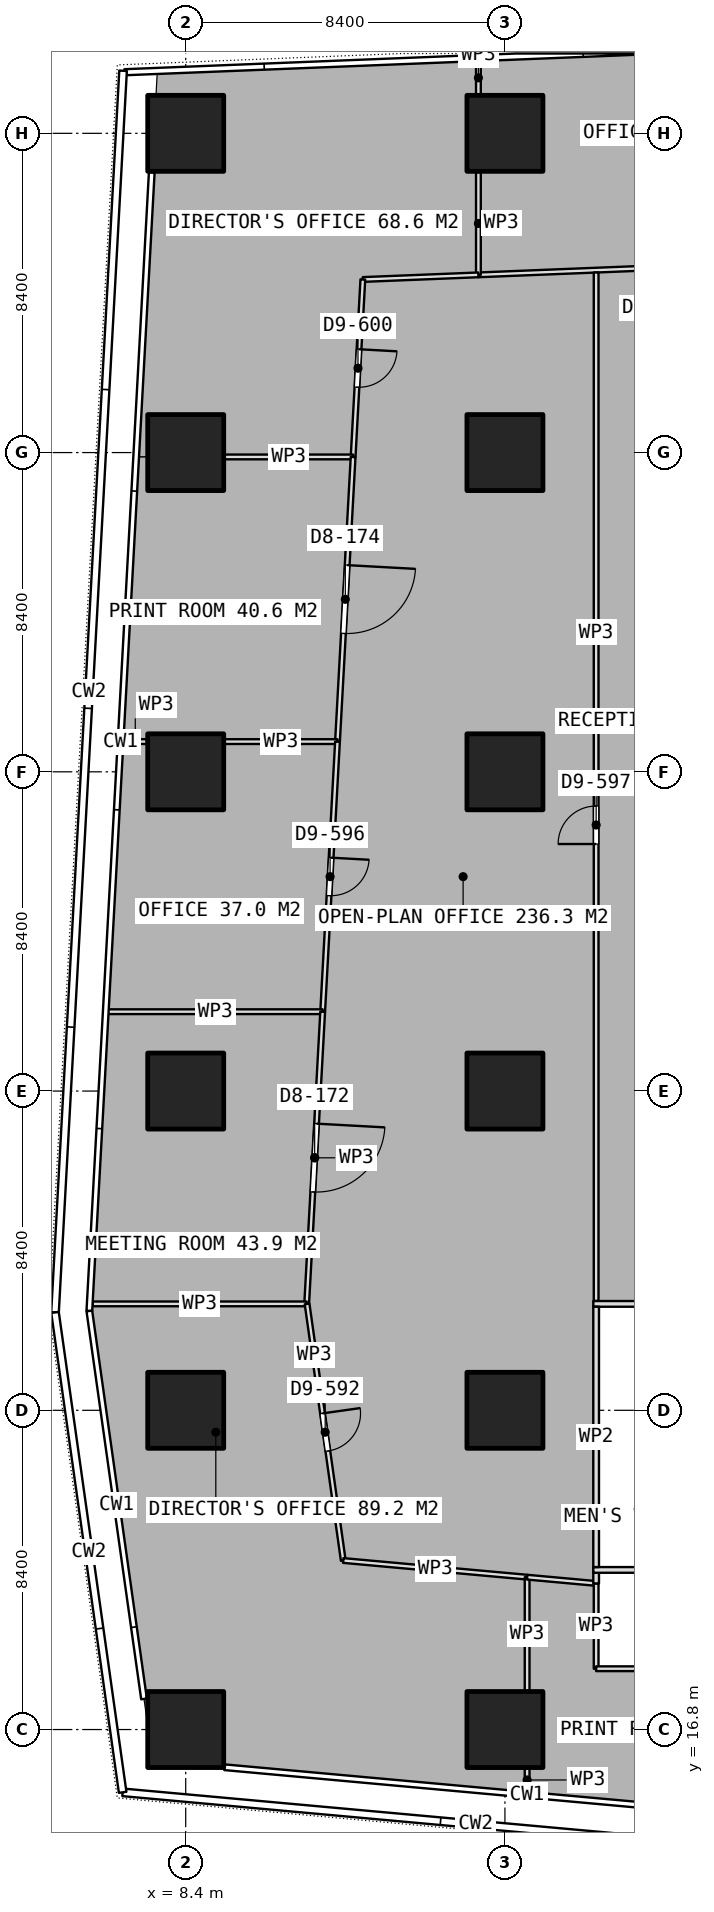
"""IFC4 building model, lengths in metres.
Left out: names, types, materials, properties, quantities, classifications, styles, units other than length and angle.
Written with IfcOpenShell. Run it as: python <this file> out.ifc"""

import sys

from ifc_helpers import new_model, si_unit, direction, frame, frame_2d, origin, origin_2d, place, context, subcontext, project, spatial, rectangle, extrude, element, fill, save


model = new_model("IFC4")
c1 = context("Model", 3, precision=1e-05, world=origin(), true_north=direction((0.0, 1.0)))
c2 = subcontext(c1, "Body", "Model", "MODEL_VIEW")
j1 = project(units=[si_unit("LENGTHUNIT", "METRE"), si_unit("PLANEANGLEUNIT", "RADIAN")], contexts=[c1])
p1 = place(None, origin())
s1 = spatial("IfcSite", under=j1, at=p1, CompositionType="ELEMENT")
p2 = place(p1, origin())
s2 = spatial("IfcBuilding", under=s1, at=p2, CompositionType="ELEMENT")
p3 = place(p2, frame((0.0, 0.0, 147.8)))
s3 = spatial("IfcBuildingStorey", under=s2, at=p3, CompositionType="ELEMENT", Elevation=147.8)
for number, where, z_axis, x_axis in (
    (1, (8.4, 16.8, 0.0), (0.0, 0.0, 1.0), (1.0, 0.0, 0.0)),
    (2, (8.4, 25.2, 0.0), (0.0, 0.0, 1.0), (1.0, 0.0, 0.0)),
    (3, (8.4, 33.6, 0.0), (0.0, 0.0, 1.0), (1.0, 0.0, 0.0)),
    (4, (8.4, 42.0, 0.0), (0.0, 0.0, 1.0), (1.0, 0.0, 0.0)),
    (5, (8.4, 50.4, 0.0), (0.0, 0.0, 1.0), (1.0, 0.0, 0.0)),
    (6, (8.4, 58.8, 0.0), (0.0, 0.0, 1.0), (1.0, 0.0, 0.0)),
    (7, (16.8, 16.8, 0.0), (0.0, 0.0, 1.0), (1.0, 0.0, 0.0)),
    (8, (16.8, 25.2, 0.0), (0.0, 0.0, 1.0), (1.0, 0.0, 0.0)),
    (9, (16.8, 33.6, 0.0), (0.0, 0.0, 1.0), (1.0, 0.0, 0.0)),
    (10, (16.8, 42.0, 0.0), (0.0, 0.0, 1.0), (1.0, 0.0, 0.0)),
    (11, (16.8, 50.4, 0.0), (0.0, 0.0, 1.0), (1.0, 0.0, 0.0)),
    (12, (16.8, 58.8, 0.0), (0.0, 0.0, 1.0), (1.0, 0.0, 0.0)),
):
    element("IfcColumn", number, at=place(p3, frame(where, z_axis=z_axis, x_axis=x_axis)), inside=s3, PredefinedType="COLUMN", context=c2, shape_type="SweptSolid", body=[
        extrude(rectangle(XDim=2.0, YDim=2.0, at=origin_2d()), origin(), (0.0, 0.0, 1.0), 3.75),
    ])
for number, where, z_axis, x_axis in (
    (13, (19.125, 21.0, 0.0), (0.0, 0.0, 1.0), (1.0, 0.0, 0.0)),
    (14, (19.125, 28.0, 0.0), (0.0, 0.0, 1.0), (1.0, 0.0, 0.0)),
):
    element("IfcWall", number, at=place(p3, frame(where, z_axis=z_axis, x_axis=x_axis)), inside=s3, PredefinedType="PARTITIONING", context=c2, shape_type="SweptSolid", body=[
        extrude(rectangle(XDim=3.35, YDim=0.15, at=frame_2d((1.675, 0.0))), origin(), (0.0, 0.0, 1.0), 3.5),
    ])
p4 = place(p3, frame((19.2, 21.075, 0.0), z_axis=(0.0, 0.0, 1.0), x_axis=(0.0, 1.0, 0.0)))
e15 = element("IfcWall", 15, at=p4, inside=s3, PredefinedType="PARTITIONING", context=c2, shape_type="SweptSolid", body=[
    extrude(rectangle(XDim=6.85, YDim=0.15, at=frame_2d((3.425, 0.0))), origin(), (0.0, 0.0, 1.0), 3.5),
])
p5 = place(p3, frame((25.413, 55.449, 0.0), z_axis=(0.0, 0.0, 1.0), x_axis=(-0.999198361773, -0.04003290935, 0.0)))
e16 = element("IfcWall", 16, at=p5, inside=s3, PredefinedType="PARTITIONING", context=c2, shape_type="SweptSolid", body=[
    extrude(rectangle(XDim=9.319, YDim=0.125, at=frame_2d((4.659, 0.0))), origin(), (0.0, 0.0, 1.0), 3.5),
])
p6 = place(p5, frame((4.159, 0.0, 0.0)))
e17 = element("IfcOpeningElement", 17, at=p6, cuts=e16, PredefinedType="OPENING", context=c2, shape_type="SweptSolid", body=[
    extrude(rectangle(XDim=1.0, YDim=2.1, at=frame_2d((0.5, 1.05))), frame((0.0, 0.073, 0.0), z_axis=(0.0, -1.0, 0.0), x_axis=(1.0, 0.0, 0.0)), (0.0, 0.0, 1.0), 0.145),
])
p7 = place(p3, frame((16.102, 55.076, 0.0), z_axis=(0.0, 0.0, 1.0), x_axis=(0.0, 1.0, 0.0)))
e18 = element("IfcWall", 18, at=p7, inside=s3, PredefinedType="PARTITIONING", context=c2, shape_type="SweptSolid", body=[
    extrude(rectangle(XDim=2.704, YDim=0.125, at=frame_2d((1.352, 0.0))), origin(), (0.0, 0.0, 1.0), 3.5),
])
p8 = place(p3, frame((16.102, 59.82, 0.0), z_axis=(0.0, 0.0, 1.0), x_axis=(0.0, 1.0, 0.0)))
e19 = element("IfcWall", 19, at=p8, inside=s3, PredefinedType="PARTITIONING", context=c2, shape_type="SweptSolid", body=[
    extrude(rectangle(XDim=0.88, YDim=0.125, at=frame_2d((0.44, 0.0))), origin(), (0.0, 0.0, 1.0), 3.5),
])
p9 = place(p3, frame((16.101, 55.076, 0.0), z_axis=(0.0, 0.0, 1.0), x_axis=(-0.999198007742, -0.040041744769, 0.0)))
e20 = element("IfcWall", 20, at=p9, inside=s3, PredefinedType="PARTITIONING", context=c2, shape_type="SweptSolid", body=[
    extrude(rectangle(XDim=3.042, YDim=0.125, at=frame_2d((1.521, 0.0))), origin(), (0.0, 0.0, 1.0), 3.5),
])
p10 = place(p3, frame((13.061, 54.954, 0.0), z_axis=(0.0, 0.0, 1.0), x_axis=(-0.054767351649, -0.99849914231, 0.0)))
e21 = element("IfcWall", 21, at=p10, inside=s3, PredefinedType="PARTITIONING", context=c2, shape_type="SweptSolid", body=[
    extrude(rectangle(XDim=4.676, YDim=0.125, at=frame_2d((2.338, 0.0))), origin(), (0.0, 0.0, 1.0), 3.5),
])
p11 = place(p10, frame((1.838, 0.0, 0.0)))
e22 = element("IfcOpeningElement", 22, at=p11, cuts=e21, PredefinedType="OPENING", context=c2, shape_type="SweptSolid", body=[
    extrude(rectangle(XDim=1.0, YDim=2.1, at=frame_2d((0.5, 1.05))), frame((0.0, 0.073, 0.0), z_axis=(0.0, -1.0, 0.0), x_axis=(1.0, 0.0, 0.0)), (0.0, 0.0, 1.0), 0.145),
])
p12 = place(p3, frame((12.805, 50.285, 0.0), z_axis=(0.0, 0.0, 1.0), x_axis=(-1.0, 0.0, 0.0)))
e23 = element("IfcWall", 23, at=p12, inside=s3, PredefinedType="PARTITIONING", context=c2, shape_type="SweptSolid", body=[
    extrude(rectangle(XDim=3.385, YDim=0.125, at=frame_2d((1.692, 0.0))), origin(), (0.0, 0.0, 1.0), 3.5),
])
p13 = place(p3, frame((12.805, 50.284, 0.0), z_axis=(0.0, 0.0, 1.0), x_axis=(-0.054783132828, -0.998498276592, 0.0)))
e24 = element("IfcWall", 24, at=p13, inside=s3, PredefinedType="PARTITIONING", context=c2, shape_type="SweptSolid", body=[
    extrude(rectangle(XDim=7.5, YDim=0.125, at=frame_2d((3.75, 0.0))), origin(), (0.0, 0.0, 1.0), 3.5),
])
p14 = place(p13, frame((2.85, 0.0, 0.0)))
e25 = element("IfcOpeningElement", 25, at=p14, cuts=e24, PredefinedType="OPENING", context=c2, shape_type="SweptSolid", body=[
    extrude(rectangle(XDim=1.8, YDim=2.1, at=frame_2d((0.9, 1.05))), frame((0.0, 0.073, 0.0), z_axis=(0.0, -1.0, 0.0), x_axis=(1.0, 0.0, 0.0)), (0.0, 0.0, 1.0), 0.145),
])
p15 = place(p3, frame((12.394, 42.795, 0.0), z_axis=(0.0, 0.0, 1.0), x_axis=(-1.0, 0.0, 0.0)))
e26 = element("IfcWall", 26, at=p15, inside=s3, PredefinedType="PARTITIONING", context=c2, shape_type="SweptSolid", body=[
    extrude(rectangle(XDim=2.974, YDim=0.125, at=frame_2d((1.487, 0.0))), origin(), (0.0, 0.0, 1.0), 3.5),
])
p16 = place(p3, frame((7.38, 42.795, 0.0), z_axis=(0.0, 0.0, 1.0), x_axis=(-1.0, 0.0, 0.0)))
e27 = element("IfcWall", 27, at=p16, inside=s3, PredefinedType="PARTITIONING", context=c2, shape_type="SweptSolid", body=[
    extrude(rectangle(XDim=0.614, YDim=0.125, at=frame_2d((0.307, 0.0))), origin(), (0.0, 0.0, 1.0), 3.5),
])
p17 = place(p3, frame((12.394, 42.794, 0.0), z_axis=(0.0, 0.0, 1.0), x_axis=(-0.054820208694, -0.998496241715, 0.0)))
e28 = element("IfcWall", 28, at=p17, inside=s3, PredefinedType="PARTITIONING", context=c2, shape_type="SweptSolid", body=[
    extrude(rectangle(XDim=7.117, YDim=0.125, at=frame_2d((3.558, 0.0))), origin(), (0.0, 0.0, 1.0), 3.5),
])
p18 = place(p17, frame((3.058, 0.0, 0.0)))
e29 = element("IfcOpeningElement", 29, at=p18, cuts=e28, PredefinedType="OPENING", context=c2, shape_type="SweptSolid", body=[
    extrude(rectangle(XDim=1.0, YDim=2.1, at=frame_2d((0.5, 1.05))), frame((0.0, 0.073, 0.0), z_axis=(0.0, -1.0, 0.0), x_axis=(1.0, 0.0, 0.0)), (0.0, 0.0, 1.0), 0.145),
])
p19 = place(p3, frame((12.004, 35.688, 0.0), z_axis=(0.0, 0.0, 1.0), x_axis=(-1.0, 0.0, 0.0)))
e30 = element("IfcWall", 30, at=p19, inside=s3, PredefinedType="PARTITIONING", context=c2, shape_type="SweptSolid", body=[
    extrude(rectangle(XDim=5.658, YDim=0.125, at=frame_2d((2.829, 0.0))), origin(), (0.0, 0.0, 1.0), 3.5),
])
p20 = place(p3, frame((12.004, 35.687, 0.0), z_axis=(0.0, 0.0, 1.0), x_axis=(-0.054672599676, -0.998504334915, 0.0)))
e31 = element("IfcWall", 31, at=p20, inside=s3, PredefinedType="PARTITIONING", context=c2, shape_type="SweptSolid", body=[
    extrude(rectangle(XDim=7.698, YDim=0.125, at=frame_2d((3.849, 0.0))), origin(), (0.0, 0.0, 1.0), 3.5),
])
p21 = place(p20, frame((2.949, 0.0, 0.0)))
e32 = element("IfcOpeningElement", 32, at=p21, cuts=e31, PredefinedType="OPENING", context=c2, shape_type="SweptSolid", body=[
    extrude(rectangle(XDim=1.8, YDim=2.1, at=frame_2d((0.9, 1.05))), frame((0.0, 0.073, 0.0), z_axis=(0.0, -1.0, 0.0), x_axis=(1.0, 0.0, 0.0)), (0.0, 0.0, 1.0), 0.145),
])
p22 = place(p3, frame((11.583, 28.0, 0.0), z_axis=(0.0, 0.0, 1.0), x_axis=(-1.0, 0.0, 0.0)))
e33 = element("IfcWall", 33, at=p22, inside=s3, PredefinedType="PARTITIONING", context=c2, shape_type="SweptSolid", body=[
    extrude(rectangle(XDim=5.629, YDim=0.125, at=frame_2d((2.814, 0.0))), origin(), (0.0, 0.0, 1.0), 3.5),
])
p23 = place(p3, frame((11.594, 27.999, 0.0), z_axis=(0.0, 0.0, 1.0), x_axis=(0.139621335816, -0.990204969986, 0.0)))
e34 = element("IfcWall", 34, at=p23, inside=s3, PredefinedType="PARTITIONING", context=c2, shape_type="SweptSolid", body=[
    extrude(rectangle(XDim=6.818, YDim=0.125, at=frame_2d((3.409, 0.0))), origin(), (0.0, 0.0, 1.0), 3.5),
])
p24 = place(p23, frame((2.909, 0.0, 0.0)))
e35 = element("IfcOpeningElement", 35, at=p24, cuts=e34, PredefinedType="OPENING", context=c2, shape_type="SweptSolid", body=[
    extrude(rectangle(XDim=1.0, YDim=2.1, at=frame_2d((0.5, 1.05))), frame((0.0, 0.073, 0.0), z_axis=(0.0, -1.0, 0.0), x_axis=(1.0, 0.0, 0.0)), (0.0, 0.0, 1.0), 0.145),
])
p25 = place(p3, frame((12.546, 21.248, 0.0), z_axis=(0.0, 0.0, 1.0), x_axis=(0.995909256007, -0.090359027214, 0.0)))
e36 = element("IfcWall", 36, at=p25, inside=s3, PredefinedType="PARTITIONING", context=c2, shape_type="SweptSolid", body=[
    extrude(rectangle(XDim=4.858, YDim=0.125, at=frame_2d((2.429, 0.0))), origin(), (0.0, 0.0, 1.0), 3.5),
])
p26 = place(p3, frame((17.384, 20.809, 0.0), z_axis=(0.0, 0.0, 1.0), x_axis=(0.0, -1.0, 0.0)))
e37 = element("IfcWall", 37, at=p26, inside=s3, PredefinedType="PARTITIONING", context=c2, shape_type="SweptSolid", body=[
    extrude(rectangle(XDim=2.989, YDim=0.125, at=frame_2d((1.495, 0.0))), origin(), (0.0, 0.0, 1.0), 3.5),
])
p27 = place(p3, frame((17.384, 15.78, 0.0), z_axis=(0.0, 0.0, 1.0), x_axis=(0.0, -1.0, 0.0)))
e38 = element("IfcWall", 38, at=p27, inside=s3, PredefinedType="PARTITIONING", context=c2, shape_type="SweptSolid", body=[
    extrude(rectangle(XDim=0.614, YDim=0.125, at=frame_2d((0.307, 0.0))), origin(), (0.0, 0.0, 1.0), 3.5),
])
p28 = place(p3, frame((17.385, 20.809, 0.0), z_axis=(0.0, 0.0, 1.0), x_axis=(0.995891010038, -0.090559903522, 0.0)))
e39 = element("IfcWall", 39, at=p28, inside=s3, PredefinedType="PARTITIONING", context=c2, shape_type="SweptSolid", body=[
    extrude(rectangle(XDim=1.823, YDim=0.125, at=frame_2d((0.911, 0.0))), origin(), (0.0, 0.0, 1.0), 3.5),
])
p29 = place(p3, frame((19.2, 20.644, 0.0), z_axis=(0.0, 0.0, 1.0), x_axis=(0.0, -1.0, 0.0)))
e40 = element("IfcWall", 40, at=p29, inside=s3, PredefinedType="PARTITIONING", context=c2, shape_type="SweptSolid", body=[
    extrude(rectangle(XDim=2.244, YDim=0.125, at=frame_2d((1.122, 0.0))), origin(), (0.0, 0.0, 1.0), 3.5),
])
p30 = place(p3, frame((19.2, 18.4, 0.0), z_axis=(0.0, 0.0, 1.0), x_axis=(1.0, 0.0, 0.0)))
e41 = element("IfcWall", 41, at=p30, inside=s3, PredefinedType="PARTITIONING", context=c2, shape_type="SweptSolid", body=[
    extrude(rectangle(XDim=6.179, YDim=0.125, at=frame_2d((3.089, 0.0))), origin(), (0.0, 0.0, 1.0), 3.5),
])
p31 = place(p30, frame((2.59, 0.0, 0.0)))
e42 = element("IfcOpeningElement", 42, at=p31, cuts=e41, PredefinedType="OPENING", context=c2, shape_type="SweptSolid", body=[
    extrude(rectangle(XDim=1.0, YDim=2.1, at=frame_2d((0.5, 1.05))), frame((0.0, 0.073, 0.0), z_axis=(0.0, -1.0, 0.0), x_axis=(1.0, 0.0, 0.0)), (0.0, 0.0, 1.0), 0.145),
])
p32 = place(p3, frame((19.2, 28.075, 0.0), z_axis=(0.0, 0.0, 1.0), x_axis=(0.0, 1.0, 0.0)))
e43 = element("IfcWall", 43, at=p32, inside=s3, PredefinedType="PARTITIONING", context=c2, shape_type="SweptSolid", body=[
    extrude(rectangle(XDim=27.063, YDim=0.125, at=frame_2d((13.531, 0.0))), origin(), (0.0, 0.0, 1.0), 3.5),
])
p33 = place(p32, frame((12.025, 0.0, 0.0)))
e44 = element("IfcOpeningElement", 44, at=p33, cuts=e43, PredefinedType="OPENING", context=c2, shape_type="SweptSolid", body=[
    extrude(rectangle(XDim=1.0, YDim=2.1, at=frame_2d((0.5, 1.05))), frame((0.0, 0.073, 0.0), z_axis=(0.0, -1.0, 0.0), x_axis=(1.0, 0.0, 0.0)), (0.0, 0.0, 1.0), 0.145),
])
p34 = place(p3, frame((19.2, 21.075, 0.0), z_axis=(0.0, 0.0, 1.0), x_axis=(0.0, -1.0, 0.0)))
e45 = element("IfcWall", 45, at=p34, inside=s3, PredefinedType="PARTITIONING", context=c2, shape_type="SweptSolid", body=[
    extrude(rectangle(XDim=0.431, YDim=0.15, at=frame_2d((0.215, 0.0))), origin(), (0.0, 0.0, 1.0), 3.5),
])
p35 = place(p11, origin())
e46 = element("IfcDoor", 46, at=p35, inside=s3, OperationType="SINGLE_SWING_LEFT", PredefinedType="DOOR", context=c2, shape_type="SweptSolid", body=[
    extrude(rectangle(XDim=1.0, YDim=2.1, at=frame_2d((0.5, 1.05))), frame((0.0, 0.025, 0.0), z_axis=(0.0, -1.0, 0.0), x_axis=(1.0, 0.0, 0.0)), (0.0, 0.0, 1.0), 0.05),
])
fill(e22, e46)
p36 = place(p14, origin())
e47 = element("IfcDoor", 47, at=p36, inside=s3, OperationType="DOUBLE_DOOR_SINGLE_SWING", PredefinedType="DOOR", context=c2, shape_type="SweptSolid", body=[
    extrude(rectangle(XDim=1.8, YDim=2.1, at=frame_2d((0.9, 1.05))), frame((0.0, 0.025, 0.0), z_axis=(0.0, -1.0, 0.0), x_axis=(1.0, 0.0, 0.0)), (0.0, 0.0, 1.0), 0.05),
])
fill(e25, e47)
p37 = place(p18, origin())
e48 = element("IfcDoor", 48, at=p37, inside=s3, OperationType="SINGLE_SWING_LEFT", PredefinedType="DOOR", context=c2, shape_type="SweptSolid", body=[
    extrude(rectangle(XDim=1.0, YDim=2.1, at=frame_2d((0.5, 1.05))), frame((0.0, 0.025, 0.0), z_axis=(0.0, -1.0, 0.0), x_axis=(1.0, 0.0, 0.0)), (0.0, 0.0, 1.0), 0.05),
])
fill(e29, e48)
p38 = place(p21, origin())
e49 = element("IfcDoor", 49, at=p38, inside=s3, OperationType="DOUBLE_DOOR_SINGLE_SWING", PredefinedType="DOOR", context=c2, shape_type="SweptSolid", body=[
    extrude(rectangle(XDim=1.8, YDim=2.1, at=frame_2d((0.9, 1.05))), frame((0.0, 0.025, 0.0), z_axis=(0.0, -1.0, 0.0), x_axis=(1.0, 0.0, 0.0)), (0.0, 0.0, 1.0), 0.05),
])
fill(e32, e49)
p39 = place(p24, origin())
e50 = element("IfcDoor", 50, at=p39, inside=s3, OperationType="SINGLE_SWING_LEFT", PredefinedType="DOOR", context=c2, shape_type="SweptSolid", body=[
    extrude(rectangle(XDim=1.0, YDim=2.1, at=frame_2d((0.5, 1.05))), frame((0.0, 0.025, 0.0), z_axis=(0.0, -1.0, 0.0), x_axis=(1.0, 0.0, 0.0)), (0.0, 0.0, 1.0), 0.05),
])
fill(e35, e50)
p40 = place(p33, origin())
e51 = element("IfcDoor", 51, at=p40, inside=s3, OperationType="SINGLE_SWING_LEFT", PredefinedType="DOOR", context=c2, shape_type="SweptSolid", body=[
    extrude(rectangle(XDim=1.0, YDim=2.1, at=frame_2d((0.5, 1.05))), frame((0.0, 0.025, 0.0), z_axis=(0.0, -1.0, 0.0), x_axis=(1.0, 0.0, 0.0)), (0.0, 0.0, 1.0), 0.05),
])
fill(e44, e51)
save(model, sys.argv[1])
